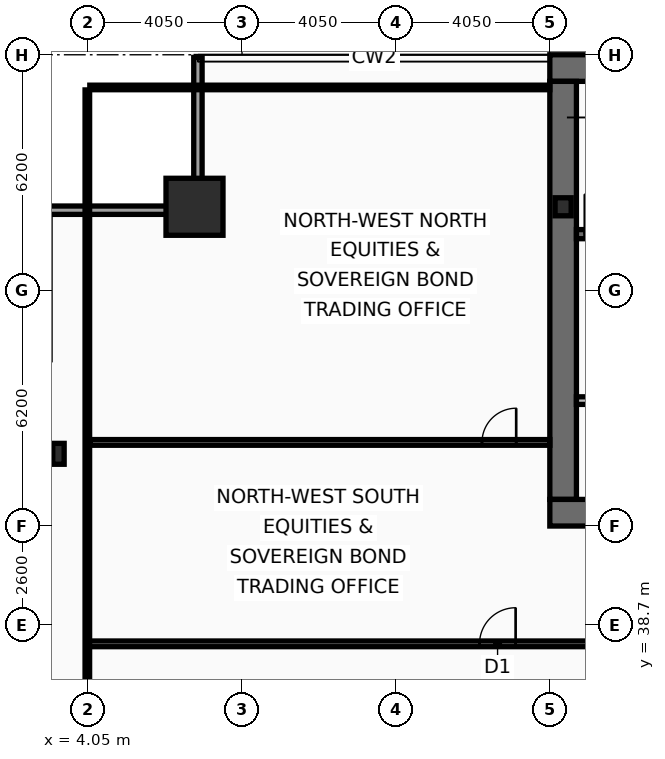
"""IFC4 building model, lengths in metres.
Left out: names, types, materials, properties, quantities, classifications, styles, units other than length and angle.
Written with IfcOpenShell. Run it as: python <this file> out.ifc"""

import sys

from ifc_helpers import new_model, si_unit, direction, frame, frame_2d, origin, origin_2d, place, context, subcontext, project, spatial, rectangle, hollow_rectangle, i_section, extrude, element, fill, save


model = new_model("IFC4")
c1 = context("Model", 3, precision=1e-05, world=origin(), true_north=direction((0.0, 1.0)))
c2 = subcontext(c1, "Body", "Model", "MODEL_VIEW")
j1 = project(units=[si_unit("LENGTHUNIT", "METRE"), si_unit("PLANEANGLEUNIT", "RADIAN")], contexts=[c1])
p1 = place(None, origin())
s1 = spatial("IfcSite", under=j1, at=p1, CompositionType="ELEMENT")
p2 = place(p1, origin())
s2 = spatial("IfcBuilding", under=s1, at=p2, CompositionType="ELEMENT")
p3 = place(p2, frame((0.0, 0.0, 94.6)))
s3 = spatial("IfcBuildingStorey", under=s2, at=p3, CompositionType="ELEMENT", Elevation=94.6)
p4 = place(p3, frame((16.2, 53.35, 0.0), z_axis=(0.0, 0.0, 1.0), x_axis=(1.0, 0.0, 0.0)))
e1 = element("IfcWall", 1, at=p4, inside=s3, PredefinedType="SHEAR", context=c2, shape_type="SweptSolid", body=[
    extrude(rectangle(XDim=40.5, YDim=0.7, at=frame_2d((20.25, 0.0))), origin(), (0.0, 0.0, 1.0), 3.82),
])
p5 = place(p3, frame((16.55, 42.0, 0.0), z_axis=(0.0, 0.0, 1.0), x_axis=(0.0, 1.0, 0.0)))
e2 = element("IfcWall", 2, at=p5, inside=s3, PredefinedType="SHEAR", context=c2, shape_type="SweptSolid", body=[
    extrude(rectangle(XDim=11.0, YDim=0.7, at=frame_2d((5.5, 0.0))), origin(), (0.0, 0.0, 1.0), 3.82),
])
p6 = place(p3, frame((18.65, 41.65, 0.0), z_axis=(0.0, 0.0, 1.0), x_axis=(-1.0, 0.0, 0.0)))
e3 = element("IfcWall", 3, at=p6, inside=s3, PredefinedType="SHEAR", context=c2, shape_type="SweptSolid", body=[
    extrude(rectangle(XDim=2.45, YDim=0.7, at=frame_2d((1.225, 0.0))), origin(), (0.0, 0.0, 1.0), 3.82),
])
p7 = place(p3, frame((16.9, 48.98, 0.0), z_axis=(0.0, 0.0, 1.0), x_axis=(1.0, 0.0, 0.0)))
e4 = element("IfcWall", 4, at=p7, inside=s3, PredefinedType="SHEAR", context=c2, shape_type="SweptSolid", body=[
    extrude(rectangle(XDim=7.32, YDim=0.24, at=frame_2d((3.66, 0.0))), origin(), (0.0, 0.0, 1.0), 3.82),
])
p8 = place(p7, frame((0.22, 0.0, 0.0)))
e5 = element("IfcOpeningElement", 5, at=p8, cuts=e4, PredefinedType="OPENING", context=c2, shape_type="SweptSolid", body=[
    extrude(rectangle(XDim=1.05, YDim=2.15, at=frame_2d((0.525, 1.075))), frame((0.0, 0.13, 0.0), z_axis=(0.0, -1.0, 0.0), x_axis=(1.0, 0.0, 0.0)), (0.0, 0.0, 1.0), 0.26),
])
p9 = place(p3, frame((6.85, 49.7, 0.0), z_axis=(0.0, 0.0, 1.0), x_axis=(1.0, 0.0, 0.0)))
e6 = element("IfcColumn", 6, at=p9, inside=s3, PredefinedType="COLUMN", context=c2, shape_type="SweptSolid", body=[
    extrude(hollow_rectangle(XDim=1.5, YDim=1.5, WallThickness=0.07, at=origin_2d()), origin(), (0.0, 0.0, 1.0), 4.0),
])
p10 = place(p3, frame((3.27, 43.2, 0.0), z_axis=(0.0, 0.0, 1.0), x_axis=(1.0, 0.0, 0.0)))
e7 = element("IfcColumn", 7, at=p10, inside=s3, PredefinedType="COLUMN", context=c2, shape_type="SweptSolid", body=[
    extrude(i_section(OverallWidth=0.3, OverallDepth=0.55, WebThickness=0.015, FlangeThickness=0.029, at=origin_2d()), origin(), (0.0, 0.0, 1.0), 4.0),
])
p11 = place(p3, frame((16.55, 49.7, 0.0), z_axis=(0.0, 0.0, 1.0), x_axis=(1.0, 0.0, 0.0)))
e8 = element("IfcColumn", 8, at=p11, inside=s3, PredefinedType="COLUMN", context=c2, shape_type="SweptSolid", body=[
    extrude(i_section(OverallWidth=0.424, OverallDepth=0.474, WebThickness=0.048, FlangeThickness=0.077, at=origin_2d()), origin(), (0.0, 0.0, 1.0), 4.0),
])
p12 = place(p3, frame((2.83, 49.61, 0.0), z_axis=(0.0, 0.0, 1.0), x_axis=(1.0, 0.0, 0.0)))
e9 = element("IfcWall", 9, at=p12, inside=s3, PredefinedType="SOLIDWALL", context=c2, shape_type="SweptSolid", body=[
    extrude(rectangle(XDim=4.22, YDim=0.22, at=frame_2d((2.11, 0.0))), origin(), (0.0, 0.0, 1.0), 3.16),
])
p13 = place(p3, frame((6.94, 49.72, 0.0), z_axis=(0.0, 0.0, 1.0), x_axis=(0.0, 1.0, 0.0)))
e10 = element("IfcWall", 10, at=p13, inside=s3, PredefinedType="SOLIDWALL", context=c2, shape_type="SweptSolid", body=[
    extrude(rectangle(XDim=3.91, YDim=0.22, at=frame_2d((1.955, 0.0))), origin(), (0.0, 0.0, 1.0), 3.16),
])
p14 = place(p3, frame((16.9, 44.6, 0.0), z_axis=(0.0, 0.0, 1.0), x_axis=(1.0, 0.0, 0.0)))
e11 = element("IfcWall", 11, at=p14, inside=s3, PredefinedType="PARTITIONING", context=c2, shape_type="SweptSolid", body=[
    extrude(rectangle(XDim=4.1, YDim=0.2, at=frame_2d((2.05, 0.0))), origin(), (0.0, 0.0, 1.0), 3.82),
])
p15 = place(p14, frame((1.25, 0.0, 0.0)))
e12 = element("IfcOpeningElement", 12, at=p15, cuts=e11, PredefinedType="OPENING", context=c2, shape_type="SweptSolid", body=[
    extrude(rectangle(XDim=1.05, YDim=2.15, at=frame_2d((0.525, 1.075))), frame((0.0, 0.11, 0.0), z_axis=(0.0, -1.0, 0.0), x_axis=(1.0, 0.0, 0.0)), (0.0, 0.0, 1.0), 0.22),
])
p16 = place(p3, frame((4.03, 38.2, 0.0), z_axis=(0.0, 0.0, 1.0), x_axis=(1.0, 0.0, 0.0)))
e13 = element("IfcWall", 13, at=p16, inside=s3, PredefinedType="PARTITIONING", context=c2, shape_type="SweptSolid", body=[
    extrude(rectangle(XDim=14.52, YDim=0.15, at=frame_2d((7.26, 0.0))), origin(), (0.0, 0.0, 1.0), 3.01),
])
p17 = place(p16, frame((10.32, 0.0, 0.0)))
e14 = element("IfcOpeningElement", 14, at=p17, cuts=e13, PredefinedType="OPENING", context=c2, shape_type="SweptSolid", body=[
    extrude(rectangle(XDim=0.95, YDim=2.05, at=frame_2d((0.475, 1.025))), frame((0.0, 0.085, 0.0), z_axis=(0.0, -1.0, 0.0), x_axis=(1.0, 0.0, 0.0)), (0.0, 0.0, 1.0), 0.17),
])
p18 = place(p3, frame((4.095, 43.5, 0.0), z_axis=(0.0, 0.0, 1.0), x_axis=(1.0, 0.0, 0.0)))
e15 = element("IfcWall", 15, at=p18, inside=s3, PredefinedType="PARTITIONING", context=c2, shape_type="SweptSolid", body=[
    extrude(rectangle(XDim=12.105, YDim=0.15, at=frame_2d((6.052, 0.0))), origin(), (0.0, 0.0, 1.0), 3.01),
])
p19 = place(p18, frame((10.32, 0.0, 0.0)))
e16 = element("IfcOpeningElement", 16, at=p19, cuts=e15, PredefinedType="OPENING", context=c2, shape_type="SweptSolid", body=[
    extrude(rectangle(XDim=0.9, YDim=2.05, at=frame_2d((0.45, 1.025))), frame((0.0, 0.085, 0.0), z_axis=(0.0, -1.0, 0.0), x_axis=(1.0, 0.0, 0.0)), (0.0, 0.0, 1.0), 0.17),
])
p20 = place(p3, frame((4.03, 10.665, 0.0), z_axis=(0.0, 0.0, 1.0), x_axis=(0.0, 1.0, 0.0)))
e17 = element("IfcWall", 17, at=p20, inside=s3, PredefinedType="PARTITIONING", context=c2, shape_type="SweptSolid", body=[
    extrude(rectangle(XDim=42.11, YDim=0.12, at=frame_2d((21.055, 0.0))), origin(), (0.0, 0.0, 1.0), 3.01),
])
p21 = place(p3, frame((4.095, 52.84, 0.0), z_axis=(0.0, 0.0, 1.0), x_axis=(1.0, 0.0, 0.0)))
e18 = element("IfcWall", 18, at=p21, inside=s3, PredefinedType="PARTITIONING", context=c2, shape_type="SweptSolid", body=[
    extrude(rectangle(XDim=12.105, YDim=0.12, at=frame_2d((6.052, 0.0))), origin(), (0.0, 0.0, 1.0), 3.82),
])
p22 = place(p8, origin())
e19 = element("IfcDoor", 19, at=p22, inside=s3, OperationType="SINGLE_SWING_LEFT", PredefinedType="DOOR", context=c2, shape_type="SweptSolid", body=[
    extrude(rectangle(XDim=1.05, YDim=2.15, at=frame_2d((0.525, 1.075))), frame((0.0, 0.025, 0.0), z_axis=(0.0, -1.0, 0.0), x_axis=(1.0, 0.0, 0.0)), (0.0, 0.0, 1.0), 0.05),
])
fill(e5, e19)
p23 = place(p17, origin())
e20 = element("IfcDoor", 20, at=p23, inside=s3, OperationType="SINGLE_SWING_RIGHT", PredefinedType="DOOR", context=c2, shape_type="SweptSolid", body=[
    extrude(rectangle(XDim=0.95, YDim=2.05, at=frame_2d((0.475, 1.025))), frame((0.0, 0.025, 0.0), z_axis=(0.0, -1.0, 0.0), x_axis=(1.0, 0.0, 0.0)), (0.0, 0.0, 1.0), 0.05),
])
fill(e14, e20)
p24 = place(p19, origin())
e21 = element("IfcDoor", 21, at=p24, inside=s3, OperationType="SINGLE_SWING_RIGHT", PredefinedType="DOOR", context=c2, shape_type="SweptSolid", body=[
    extrude(rectangle(XDim=0.9, YDim=2.05, at=frame_2d((0.45, 1.025))), frame((0.0, 0.025, 0.0), z_axis=(0.0, -1.0, 0.0), x_axis=(1.0, 0.0, 0.0)), (0.0, 0.0, 1.0), 0.05),
])
fill(e16, e21)
save(model, sys.argv[1])
